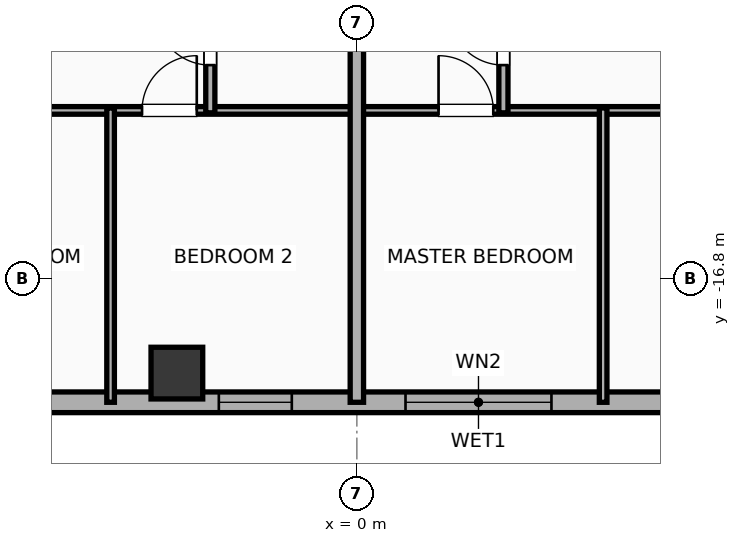
"""IFC4 building model, lengths in metres.
Left out: names, types, materials, properties, quantities, classifications, styles, units other than length and angle.
Written with IfcOpenShell. Run it as: python <this file> out.ifc"""

import sys

from ifc_helpers import new_model, si_unit, direction, frame, frame_2d, origin, origin_2d, place, context, subcontext, project, spatial, rectangle, hollow_rectangle, extrude, element, fill, save


model = new_model("IFC4")
c1 = context("Model", 3, precision=1e-05, world=origin(), true_north=direction((0.0, 1.0)))
c2 = subcontext(c1, "Body", "Model", "MODEL_VIEW")
j1 = project(units=[si_unit("LENGTHUNIT", "METRE"), si_unit("PLANEANGLEUNIT", "RADIAN")], contexts=[c1])
p1 = place(None, origin())
s1 = spatial("IfcSite", under=j1, at=p1, CompositionType="ELEMENT")
p2 = place(p1, origin())
s2 = spatial("IfcBuilding", under=s1, at=p2, CompositionType="ELEMENT")
p3 = place(p2, frame((0.0, 0.0, 219.7)))
s3 = spatial("IfcBuildingStorey", under=s2, at=p3, CompositionType="ELEMENT", Elevation=219.7)
p4 = place(p3, frame((-2.96, -18.35, 0.0), z_axis=(0.0, 0.0, 1.0), x_axis=(1.0, 0.0, 0.0)))
e1 = element("IfcColumn", 1, at=p4, inside=s3, PredefinedType="COLUMN", context=c2, shape_type="SweptSolid", body=[
    extrude(hollow_rectangle(XDim=0.85, YDim=0.85, WallThickness=0.028, at=origin_2d()), origin(), (0.0, 0.0, 1.0), 3.9),
])
p5 = place(p3, frame((26.783, -18.83, 0.0), z_axis=(0.0, 0.0, 1.0), x_axis=(-1.0, 0.0, 0.0)))
e2 = element("IfcWall", 2, at=p5, inside=s3, PredefinedType="ELEMENTEDWALL", context=c2, shape_type="SweptSolid", body=[
    extrude(rectangle(XDim=49.566, YDim=0.34, at=frame_2d((24.783, 0.0))), origin(), (0.0, 0.0, 1.0), 3.65),
])
p6 = place(p5, frame((23.583, 0.0, 0.75)))
e3 = element("IfcOpeningElement", 3, at=p6, cuts=e2, PredefinedType="OPENING", context=c2, shape_type="SweptSolid", body=[
    extrude(rectangle(XDim=2.4, YDim=2.1, at=frame_2d((1.2, 1.05))), frame((0.0, 0.18, 0.0), z_axis=(0.0, -1.0, 0.0), x_axis=(1.0, 0.0, 0.0)), (0.0, 0.0, 1.0), 0.36),
])
p7 = place(p5, frame((41.756, 0.0, 0.75)))
e4 = element("IfcOpeningElement", 4, at=p7, cuts=e2, PredefinedType="OPENING", context=c2, shape_type="SweptSolid", body=[
    extrude(rectangle(XDim=2.4, YDim=2.1, at=frame_2d((1.2, 1.05))), frame((0.0, 0.18, 0.0), z_axis=(0.0, -1.0, 0.0), x_axis=(1.0, 0.0, 0.0)), (0.0, 0.0, 1.0), 0.36),
])
p8 = place(p5, frame((47.222, 0.0, 0.75)))
e5 = element("IfcOpeningElement", 5, at=p8, cuts=e2, PredefinedType="OPENING", context=c2, shape_type="SweptSolid", body=[
    extrude(rectangle(XDim=1.2, YDim=2.05, at=frame_2d((0.6, 1.025))), frame((0.0, 0.18, 0.0), z_axis=(0.0, -1.0, 0.0), x_axis=(1.0, 0.0, 0.0)), (0.0, 0.0, 1.0), 0.36),
])
p9 = place(p5, frame((45.08, 0.0, 0.75)))
e6 = element("IfcOpeningElement", 6, at=p9, cuts=e2, PredefinedType="OPENING", context=c2, shape_type="SweptSolid", body=[
    extrude(rectangle(XDim=1.2, YDim=2.05, at=frame_2d((0.6, 1.025))), frame((0.0, 0.18, 0.0), z_axis=(0.0, -1.0, 0.0), x_axis=(1.0, 0.0, 0.0)), (0.0, 0.0, 1.0), 0.36),
])
p10 = place(p5, frame((37.289, 0.0, 0.75)))
e7 = element("IfcOpeningElement", 7, at=p10, cuts=e2, PredefinedType="OPENING", context=c2, shape_type="SweptSolid", body=[
    extrude(rectangle(XDim=1.2, YDim=2.05, at=frame_2d((0.6, 1.025))), frame((0.0, 0.18, 0.0), z_axis=(0.0, -1.0, 0.0), x_axis=(1.0, 0.0, 0.0)), (0.0, 0.0, 1.0), 0.36),
])
p11 = place(p5, frame((16.115, 0.0, 0.75)))
e8 = element("IfcOpeningElement", 8, at=p11, cuts=e2, PredefinedType="OPENING", context=c2, shape_type="SweptSolid", body=[
    extrude(rectangle(XDim=1.2, YDim=2.05, at=frame_2d((0.6, 1.025))), frame((0.0, 0.18, 0.0), z_axis=(0.0, -1.0, 0.0), x_axis=(1.0, 0.0, 0.0)), (0.0, 0.0, 1.0), 0.36),
])
p12 = place(p5, frame((12.422, 0.0, 0.75)))
e9 = element("IfcOpeningElement", 9, at=p12, cuts=e2, PredefinedType="OPENING", context=c2, shape_type="SweptSolid", body=[
    extrude(rectangle(XDim=1.2, YDim=2.05, at=frame_2d((0.6, 1.025))), frame((0.0, 0.18, 0.0), z_axis=(0.0, -1.0, 0.0), x_axis=(1.0, 0.0, 0.0)), (0.0, 0.0, 1.0), 0.36),
])
p13 = place(p5, frame((8.09, 0.0, 0.75)))
e10 = element("IfcOpeningElement", 10, at=p13, cuts=e2, PredefinedType="OPENING", context=c2, shape_type="SweptSolid", body=[
    extrude(rectangle(XDim=1.2, YDim=2.05, at=frame_2d((0.6, 1.025))), frame((0.0, 0.18, 0.0), z_axis=(0.0, -1.0, 0.0), x_axis=(1.0, 0.0, 0.0)), (0.0, 0.0, 1.0), 0.36),
])
p14 = place(p5, frame((4.637, 0.0, 0.75)))
e11 = element("IfcOpeningElement", 11, at=p14, cuts=e2, PredefinedType="OPENING", context=c2, shape_type="SweptSolid", body=[
    extrude(rectangle(XDim=1.2, YDim=2.05, at=frame_2d((0.6, 1.025))), frame((0.0, 0.18, 0.0), z_axis=(0.0, -1.0, 0.0), x_axis=(1.0, 0.0, 0.0)), (0.0, 0.0, 1.0), 0.36),
])
p15 = place(p5, frame((1.811, 0.0, 0.75)))
e12 = element("IfcOpeningElement", 12, at=p15, cuts=e2, PredefinedType="OPENING", context=c2, shape_type="SweptSolid", body=[
    extrude(rectangle(XDim=1.2, YDim=2.05, at=frame_2d((0.6, 1.025))), frame((0.0, 0.18, 0.0), z_axis=(0.0, -1.0, 0.0), x_axis=(1.0, 0.0, 0.0)), (0.0, 0.0, 1.0), 0.36),
])
p16 = place(p5, frame((32.253, 0.0, 0.75)))
e13 = element("IfcOpeningElement", 13, at=p16, cuts=e2, PredefinedType="OPENING", context=c2, shape_type="SweptSolid", body=[
    extrude(rectangle(XDim=1.2, YDim=2.05, at=frame_2d((0.6, 1.025))), frame((0.0, 0.18, 0.0), z_axis=(0.0, -1.0, 0.0), x_axis=(1.0, 0.0, 0.0)), (0.0, 0.0, 1.0), 0.36),
])
p17 = place(p5, frame((27.853, 0.0, 0.75)))
e14 = element("IfcOpeningElement", 14, at=p17, cuts=e2, PredefinedType="OPENING", context=c2, shape_type="SweptSolid", body=[
    extrude(rectangle(XDim=1.2, YDim=2.05, at=frame_2d((0.6, 1.025))), frame((0.0, 0.18, 0.0), z_axis=(0.0, -1.0, 0.0), x_axis=(1.0, 0.0, 0.0)), (0.0, 0.0, 1.0), 0.36),
])
p18 = place(p5, frame((20.473, 0.0, 0.75)))
e15 = element("IfcOpeningElement", 15, at=p18, cuts=e2, PredefinedType="OPENING", context=c2, shape_type="SweptSolid", body=[
    extrude(rectangle(XDim=1.2, YDim=2.05, at=frame_2d((0.6, 1.025))), frame((0.0, 0.18, 0.0), z_axis=(0.0, -1.0, 0.0), x_axis=(1.0, 0.0, 0.0)), (0.0, 0.0, 1.0), 0.36),
])
p19 = place(p3, frame((-8.08, -14.03, 0.0), z_axis=(0.0, 0.0, 1.0), x_axis=(1.0, 0.0, 0.0)))
e16 = element("IfcWall", 16, at=p19, inside=s3, PredefinedType="PARTITIONING", context=c2, shape_type="SweptSolid", body=[
    extrude(rectangle(XDim=8.06, YDim=0.125, at=frame_2d((4.03, 0.0))), origin(), (0.0, 0.0, 1.0), 3.65),
])
p20 = place(p19, frame((1.323, 0.0, 0.0)))
e17 = element("IfcOpeningElement", 17, at=p20, cuts=e16, PredefinedType="OPENING", context=c2, shape_type="SweptSolid", body=[
    extrude(rectangle(XDim=0.9, YDim=2.05, at=frame_2d((0.45, 1.025))), frame((0.0, 0.073, 0.0), z_axis=(0.0, -1.0, 0.0), x_axis=(1.0, 0.0, 0.0)), (0.0, 0.0, 1.0), 0.145),
])
p21 = place(p19, frame((4.547, 0.0, 0.0)))
e18 = element("IfcOpeningElement", 18, at=p21, cuts=e16, PredefinedType="OPENING", context=c2, shape_type="SweptSolid", body=[
    extrude(rectangle(XDim=0.9, YDim=2.05, at=frame_2d((0.45, 1.025))), frame((0.0, 0.073, 0.0), z_axis=(0.0, -1.0, 0.0), x_axis=(1.0, 0.0, 0.0)), (0.0, 0.0, 1.0), 0.145),
])
p22 = place(p3, frame((-2.41, -14.07, 0.0), z_axis=(0.0, 0.0, 1.0), x_axis=(0.0, 1.0, 0.0)))
e19 = element("IfcWall", 19, at=p22, inside=s3, PredefinedType="PLUMBINGWALL", context=c2, shape_type="SweptSolid", body=[
    extrude(rectangle(XDim=2.47, YDim=0.15, at=frame_2d((1.235, 0.0))), origin(), (0.0, 0.0, 1.0), 3.65),
])
p23 = place(p22, frame((0.785, 0.0, 0.0)))
e20 = element("IfcOpeningElement", 20, at=p23, cuts=e19, PredefinedType="OPENING", context=c2, shape_type="SweptSolid", body=[
    extrude(rectangle(XDim=0.9, YDim=2.05, at=frame_2d((0.45, 1.025))), frame((0.0, 0.085, 0.0), z_axis=(0.0, -1.0, 0.0), x_axis=(1.0, 0.0, 0.0)), (0.0, 0.0, 1.0), 0.17),
])
p24 = place(p3, frame((-4.05, -18.83, 0.0), z_axis=(0.0, 0.0, 1.0), x_axis=(0.0, 1.0, 0.0)))
e21 = element("IfcWall", 21, at=p24, inside=s3, PredefinedType="PARTITIONING", context=c2, shape_type="SweptSolid", body=[
    extrude(rectangle(XDim=4.84, YDim=0.125, at=frame_2d((2.42, 0.0))), origin(), (0.0, 0.0, 1.0), 3.65),
])
p25 = place(p3, frame((0.02, -14.03, 0.0), z_axis=(0.0, 0.0, 1.0), x_axis=(1.0, 0.0, 0.0)))
e22 = element("IfcWall", 22, at=p25, inside=s3, PredefinedType="PARTITIONING", context=c2, shape_type="SweptSolid", body=[
    extrude(rectangle(XDim=8.06, YDim=0.125, at=frame_2d((4.03, 0.0))), origin(), (0.0, 0.0, 1.0), 3.65),
])
p26 = place(p25, frame((1.323, 0.0, 0.0)))
e23 = element("IfcOpeningElement", 23, at=p26, cuts=e22, PredefinedType="OPENING", context=c2, shape_type="SweptSolid", body=[
    extrude(rectangle(XDim=0.9, YDim=2.05, at=frame_2d((0.45, 1.025))), frame((0.0, 0.073, 0.0), z_axis=(0.0, -1.0, 0.0), x_axis=(1.0, 0.0, 0.0)), (0.0, 0.0, 1.0), 0.145),
])
p27 = place(p25, frame((5.837, 0.0, 0.0)))
e24 = element("IfcOpeningElement", 24, at=p27, cuts=e22, PredefinedType="OPENING", context=c2, shape_type="SweptSolid", body=[
    extrude(rectangle(XDim=0.9, YDim=2.05, at=frame_2d((0.45, 1.025))), frame((0.0, 0.073, 0.0), z_axis=(0.0, -1.0, 0.0), x_axis=(1.0, 0.0, 0.0)), (0.0, 0.0, 1.0), 0.145),
])
p28 = place(p3, frame((2.41, -14.07, 0.0), z_axis=(0.0, 0.0, 1.0), x_axis=(0.0, 1.0, 0.0)))
e25 = element("IfcWall", 25, at=p28, inside=s3, PredefinedType="PLUMBINGWALL", context=c2, shape_type="SweptSolid", body=[
    extrude(rectangle(XDim=2.47, YDim=0.15, at=frame_2d((1.235, 0.0))), origin(), (0.0, 0.0, 1.0), 3.65),
])
p29 = place(p28, frame((0.785, 0.0, 0.0)))
e26 = element("IfcOpeningElement", 26, at=p29, cuts=e25, PredefinedType="OPENING", context=c2, shape_type="SweptSolid", body=[
    extrude(rectangle(XDim=0.9, YDim=2.05, at=frame_2d((0.45, 1.025))), frame((0.0, 0.085, 0.0), z_axis=(0.0, -1.0, 0.0), x_axis=(1.0, 0.0, 0.0)), (0.0, 0.0, 1.0), 0.17),
])
p30 = place(p3, frame((4.05, -18.83, 0.0), z_axis=(0.0, 0.0, 1.0), x_axis=(0.0, 1.0, 0.0)))
e27 = element("IfcWall", 27, at=p30, inside=s3, PredefinedType="PARTITIONING", context=c2, shape_type="SweptSolid", body=[
    extrude(rectangle(XDim=4.84, YDim=0.125, at=frame_2d((2.42, 0.0))), origin(), (0.0, 0.0, 1.0), 3.65),
])
p31 = place(p3, frame((0.0, -18.83, 0.0), z_axis=(0.0, 0.0, 1.0), x_axis=(0.0, 1.0, 0.0)))
e28 = element("IfcWall", 28, at=p31, inside=s3, PredefinedType="PARTITIONING", context=c2, shape_type="SweptSolid", body=[
    extrude(rectangle(XDim=9.64, YDim=0.22, at=frame_2d((4.82, 0.0))), origin(), (0.0, 0.0, 1.0), 3.65),
])
p32 = place(p6, origin())
e29 = element("IfcWindow", 29, at=p32, inside=s3, PartitioningType="SINGLE_PANEL", PredefinedType="WINDOW", context=c2, shape_type="SweptSolid", body=[
    extrude(rectangle(XDim=2.4, YDim=2.1, at=frame_2d((1.2, 1.05))), frame((0.0, 0.03, 0.0), z_axis=(0.0, -1.0, 0.0), x_axis=(1.0, 0.0, 0.0)), (0.0, 0.0, 1.0), 0.06),
])
fill(e3, e29)
p33 = place(p17, origin())
e30 = element("IfcWindow", 30, at=p33, inside=s3, PartitioningType="SINGLE_PANEL", PredefinedType="WINDOW", context=c2, shape_type="SweptSolid", body=[
    extrude(rectangle(XDim=1.2, YDim=2.05, at=frame_2d((0.6, 1.025))), frame((0.0, 0.03, 0.0), z_axis=(0.0, -1.0, 0.0), x_axis=(1.0, 0.0, 0.0)), (0.0, 0.0, 1.0), 0.06),
])
fill(e14, e30)
p34 = place(p21, origin())
e31 = element("IfcDoor", 31, at=p34, inside=s3, OperationType="SINGLE_SWING_RIGHT", PredefinedType="DOOR", context=c2, shape_type="SweptSolid", body=[
    extrude(rectangle(XDim=0.9, YDim=2.05, at=frame_2d((0.45, 1.025))), frame((0.0, 0.025, 0.0), z_axis=(0.0, -1.0, 0.0), x_axis=(1.0, 0.0, 0.0)), (0.0, 0.0, 1.0), 0.05),
])
fill(e18, e31)
p35 = place(p23, origin())
e32 = element("IfcDoor", 32, at=p35, inside=s3, OperationType="SINGLE_SWING_RIGHT", PredefinedType="DOOR", context=c2, shape_type="SweptSolid", body=[
    extrude(rectangle(XDim=0.9, YDim=2.05, at=frame_2d((0.45, 1.025))), frame((0.0, 0.025, 0.0), z_axis=(0.0, -1.0, 0.0), x_axis=(1.0, 0.0, 0.0)), (0.0, 0.0, 1.0), 0.05),
])
fill(e20, e32)
p36 = place(p26, origin())
e33 = element("IfcDoor", 33, at=p36, inside=s3, OperationType="SINGLE_SWING_LEFT", PredefinedType="DOOR", context=c2, shape_type="SweptSolid", body=[
    extrude(rectangle(XDim=0.9, YDim=2.05, at=frame_2d((0.45, 1.025))), frame((0.0, 0.025, 0.0), z_axis=(0.0, -1.0, 0.0), x_axis=(1.0, 0.0, 0.0)), (0.0, 0.0, 1.0), 0.05),
])
fill(e23, e33)
p37 = place(p29, origin())
e34 = element("IfcDoor", 34, at=p37, inside=s3, OperationType="SINGLE_SWING_RIGHT", PredefinedType="DOOR", context=c2, shape_type="SweptSolid", body=[
    extrude(rectangle(XDim=0.9, YDim=2.05, at=frame_2d((0.45, 1.025))), frame((0.0, 0.025, 0.0), z_axis=(0.0, -1.0, 0.0), x_axis=(1.0, 0.0, 0.0)), (0.0, 0.0, 1.0), 0.05),
])
fill(e26, e34)
save(model, sys.argv[1])
